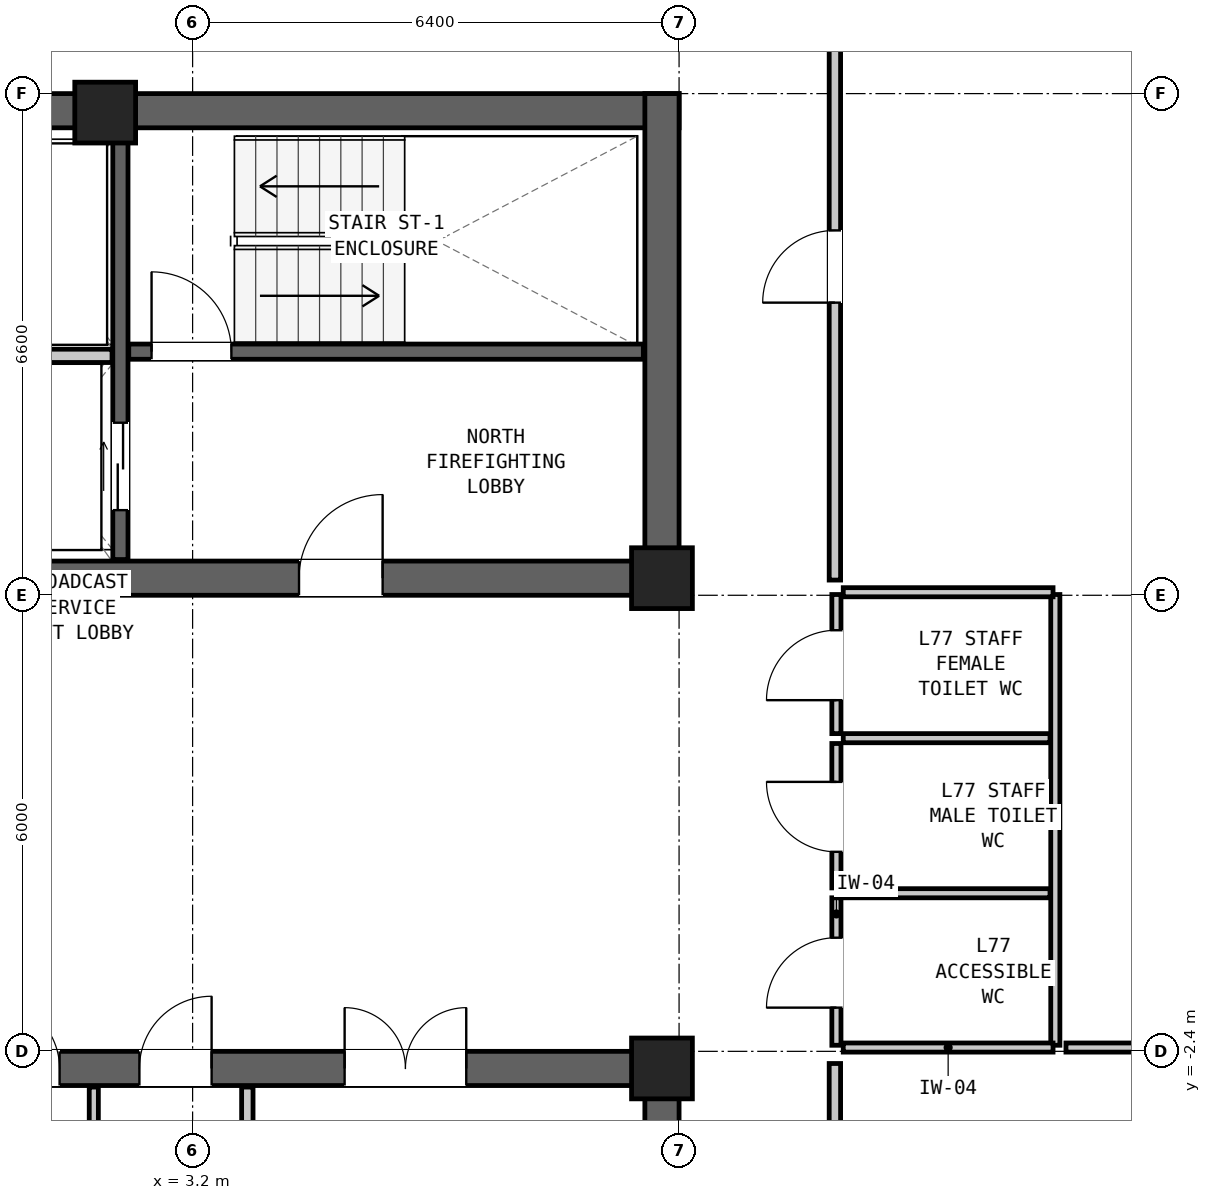
"""IFC4 building model, lengths in metres.
Left out: names, types, materials, properties, quantities, classifications, styles, units other than length and angle.
Written with IfcOpenShell. Run it as: python <this file> out.ifc"""

import sys

from ifc_helpers import new_model, si_unit, direction, frame, frame_2d, origin, origin_2d, place, context, subcontext, project, spatial, rectangle, extrude, element, fill, save


model = new_model("IFC4")
c1 = context("Model", 3, precision=1e-05, world=origin(), true_north=direction((0.0, 1.0)))
c2 = subcontext(c1, "Body", "Model", "MODEL_VIEW")
j1 = project(units=[si_unit("LENGTHUNIT", "METRE"), si_unit("PLANEANGLEUNIT", "RADIAN")], contexts=[c1])
p1 = place(None, origin())
s1 = spatial("IfcSite", under=j1, at=p1, CompositionType="ELEMENT")
p2 = place(p1, origin())
s2 = spatial("IfcBuilding", under=s1, at=p2, CompositionType="ELEMENT")
p3 = place(p2, frame((0.0, 0.0, 261.15)))
s3 = spatial("IfcBuildingStorey", under=s2, at=p3, CompositionType="ELEMENT", Elevation=261.15)
p4 = place(p3, frame((-9.6, 9.975, 0.0), z_axis=(0.0, 0.0, 1.0), x_axis=(1.0, 0.0, 0.0)))
e1 = element("IfcWall", 1, at=p4, inside=s3, PredefinedType="SHEAR", context=c2, shape_type="SweptSolid", body=[
    extrude(rectangle(XDim=19.2, YDim=0.45, at=frame_2d((9.6, 0.0))), origin(), (0.0, 0.0, 1.0), 3.05),
])
p5 = place(p3, frame((-9.6, 3.825, 0.0), z_axis=(0.0, 0.0, 1.0), x_axis=(1.0, 0.0, 0.0)))
e2 = element("IfcWall", 2, at=p5, inside=s3, PredefinedType="SHEAR", context=c2, shape_type="SweptSolid", body=[
    extrude(rectangle(XDim=19.2, YDim=0.45, at=frame_2d((9.6, 0.0))), origin(), (0.0, 0.0, 1.0), 3.05),
])
p6 = place(p5, frame((14.2, 0.0, 0.0)))
e3 = element("IfcOpeningElement", 3, at=p6, cuts=e2, PredefinedType="OPENING", context=c2, shape_type="SweptSolid", body=[
    extrude(rectangle(XDim=1.1, YDim=2.08, at=frame_2d((0.55, 1.04))), frame((0.0, 0.237, 0.0), z_axis=(0.0, -1.0, 0.0), x_axis=(1.0, 0.0, 0.0)), (0.0, 0.0, 1.0), 0.474),
])
p7 = place(p5, frame((8.2, 0.0, 0.0)))
e4 = element("IfcOpeningElement", 4, at=p7, cuts=e2, PredefinedType="OPENING", context=c2, shape_type="SweptSolid", body=[
    extrude(rectangle(XDim=1.15, YDim=2.1, at=frame_2d((0.575, 1.05))), frame((0.0, 0.237, 0.0), z_axis=(0.0, -1.0, 0.0), x_axis=(1.0, 0.0, 0.0)), (0.0, 0.0, 1.0), 0.474),
])
p8 = place(p5, frame((2.5, 0.0, 0.0)))
e5 = element("IfcOpeningElement", 5, at=p8, cuts=e2, PredefinedType="OPENING", context=c2, shape_type="SweptSolid", body=[
    extrude(rectangle(XDim=1.6, YDim=2.12, at=frame_2d((0.8, 1.06))), frame((0.0, 0.237, 0.0), z_axis=(0.0, -1.0, 0.0), x_axis=(1.0, 0.0, 0.0)), (0.0, 0.0, 1.0), 0.474),
])
p9 = place(p3, frame((9.375, 3.6, 0.0), z_axis=(0.0, 0.0, 1.0), x_axis=(0.0, 1.0, 0.0)))
e6 = element("IfcWall", 6, at=p9, inside=s3, PredefinedType="SHEAR", context=c2, shape_type="SweptSolid", body=[
    extrude(rectangle(XDim=6.6, YDim=0.45, at=frame_2d((3.3, 0.0))), origin(), (0.0, 0.0, 1.0), 3.05),
])
p10 = place(p3, frame((-9.6, -2.625, 0.0), z_axis=(0.0, 0.0, 1.0), x_axis=(1.0, 0.0, 0.0)))
e7 = element("IfcWall", 7, at=p10, inside=s3, PredefinedType="SHEAR", context=c2, shape_type="SweptSolid", body=[
    extrude(rectangle(XDim=19.2, YDim=0.45, at=frame_2d((9.6, 0.0))), origin(), (0.0, 0.0, 1.0), 3.05),
])
p11 = place(p10, frame((3.8, 0.0, 0.0)))
e8 = element("IfcOpeningElement", 8, at=p11, cuts=e7, PredefinedType="OPENING", context=c2, shape_type="SweptSolid", body=[
    extrude(rectangle(XDim=1.1, YDim=2.08, at=frame_2d((0.55, 1.04))), frame((0.0, 0.237, 0.0), z_axis=(0.0, -1.0, 0.0), x_axis=(1.0, 0.0, 0.0)), (0.0, 0.0, 1.0), 0.474),
])
p12 = place(p10, frame((10.15, 0.0, 0.0)))
e9 = element("IfcOpeningElement", 9, at=p12, cuts=e7, PredefinedType="OPENING", context=c2, shape_type="SweptSolid", body=[
    extrude(rectangle(XDim=0.9, YDim=2.05, at=frame_2d((0.45, 1.025))), frame((0.0, 0.237, 0.0), z_axis=(0.0, -1.0, 0.0), x_axis=(1.0, 0.0, 0.0)), (0.0, 0.0, 1.0), 0.474),
])
p13 = place(p10, frame((12.1, 0.0, 0.0)))
e10 = element("IfcOpeningElement", 10, at=p13, cuts=e7, PredefinedType="OPENING", context=c2, shape_type="SweptSolid", body=[
    extrude(rectangle(XDim=0.95, YDim=2.1, at=frame_2d((0.475, 1.05))), frame((0.0, 0.237, 0.0), z_axis=(0.0, -1.0, 0.0), x_axis=(1.0, 0.0, 0.0)), (0.0, 0.0, 1.0), 0.474),
])
p14 = place(p10, frame((14.8, 0.0, 0.0)))
e11 = element("IfcOpeningElement", 11, at=p14, cuts=e7, PredefinedType="OPENING", context=c2, shape_type="SweptSolid", body=[
    extrude(rectangle(XDim=1.6, YDim=2.12, at=frame_2d((0.8, 1.06))), frame((0.0, 0.237, 0.0), z_axis=(0.0, -1.0, 0.0), x_axis=(1.0, 0.0, 0.0)), (0.0, 0.0, 1.0), 0.474),
])
p15 = place(p3, frame((9.375, -9.0, 0.0), z_axis=(0.0, 0.0, 1.0), x_axis=(0.0, 1.0, 0.0)))
e12 = element("IfcWall", 12, at=p15, inside=s3, PredefinedType="SHEAR", context=c2, shape_type="SweptSolid", body=[
    extrude(rectangle(XDim=6.6, YDim=0.45, at=frame_2d((3.3, 0.0))), origin(), (0.0, 0.0, 1.0), 3.05),
])
for number, where, z_axis, x_axis in (
    (13, (2.05, 9.95, 0.0), (0.0, 0.0, 1.0), (1.0, 0.0, 0.0)),
    (14, (9.375, 3.825, 0.0), (0.0, 0.0, 1.0), (1.0, 0.0, 0.0)),
    (15, (9.375, -2.625, 0.0), (0.0, 0.0, 1.0), (1.0, 0.0, 0.0)),
):
    element("IfcColumn", number, at=place(p3, frame(where, z_axis=z_axis, x_axis=x_axis)), inside=s3, PredefinedType="COLUMN", context=c2, shape_type="SweptSolid", body=[
        extrude(rectangle(XDim=0.8, YDim=0.8, at=origin_2d()), origin(), (0.0, 0.0, 1.0), 3.05),
    ])
p16 = place(p3, frame((2.36, 6.805, 0.0), z_axis=(0.0, 0.0, 1.0), x_axis=(1.0, 0.0, 0.0)))
e16 = element("IfcWall", 16, at=p16, inside=s3, PredefinedType="SHEAR", context=c2, shape_type="SweptSolid", body=[
    extrude(rectangle(XDim=6.77, YDim=0.2, at=frame_2d((3.385, 0.0))), origin(), (0.0, 0.0, 1.0), 2.86),
])
p17 = place(p16, frame((0.3, 0.0, 0.0)))
e17 = element("IfcOpeningElement", 17, at=p17, cuts=e16, PredefinedType="OPENING", context=c2, shape_type="SweptSolid", body=[
    extrude(rectangle(XDim=1.05, YDim=2.08, at=frame_2d((0.525, 1.04))), frame((0.0, 0.112, 0.0), z_axis=(0.0, -1.0, 0.0), x_axis=(1.0, 0.0, 0.0)), (0.0, 0.0, 1.0), 0.224),
])
p18 = place(p3, frame((2.25, 4.07, 0.0), z_axis=(0.0, 0.0, 1.0), x_axis=(0.0, 1.0, 0.0)))
e18 = element("IfcWall", 18, at=p18, inside=s3, PredefinedType="SHEAR", context=c2, shape_type="SweptSolid", body=[
    extrude(rectangle(XDim=5.66, YDim=0.2, at=frame_2d((2.83, 0.0))), origin(), (0.0, 0.0, 1.0), 2.86),
])
p19 = place(p18, frame((0.65, 0.0, 0.0)))
e19 = element("IfcOpeningElement", 19, at=p19, cuts=e18, PredefinedType="OPENING", context=c2, shape_type="SweptSolid", body=[
    extrude(rectangle(XDim=1.15, YDim=2.08, at=frame_2d((0.575, 1.04))), frame((0.0, 0.112, 0.0), z_axis=(0.0, -1.0, 0.0), x_axis=(1.0, 0.0, 0.0)), (0.0, 0.0, 1.0), 0.224),
])
p20 = place(p3, frame((0.16, 6.75, 0.0), z_axis=(0.0, 0.0, 1.0), x_axis=(1.0, 0.0, 0.0)))
e20 = element("IfcWall", 20, at=p20, inside=s3, PredefinedType="PARTITIONING", context=c2, shape_type="SweptSolid", body=[
    extrude(rectangle(XDim=1.98, YDim=0.175, at=frame_2d((0.99, 0.0))), origin(), (0.0, 0.0, 1.0), 2.86),
])
p21 = place(p3, frame((3.92, -8.53, 0.0), z_axis=(0.0, 0.0, 1.0), x_axis=(0.0, 1.0, 0.0)))
e21 = element("IfcWall", 21, at=p21, inside=s3, PredefinedType="PARTITIONING", context=c2, shape_type="SweptSolid", body=[
    extrude(rectangle(XDim=5.66, YDim=0.15, at=frame_2d((2.83, 0.0))), origin(), (0.0, 0.0, 1.0), 2.86),
])
p22 = place(p3, frame((1.9, -8.53, 0.0), z_axis=(0.0, 0.0, 1.0), x_axis=(0.0, 1.0, 0.0)))
e22 = element("IfcWall", 22, at=p22, inside=s3, PredefinedType="PARTITIONING", context=c2, shape_type="SweptSolid", body=[
    extrude(rectangle(XDim=5.66, YDim=0.12, at=frame_2d((2.83, 0.0))), origin(), (0.0, 0.0, 1.0), 2.86),
])
p23 = place(p3, frame((11.67, -2.32, 0.0), z_axis=(0.0, 0.0, 1.0), x_axis=(0.0, 1.0, 0.0)))
e23 = element("IfcWall", 23, at=p23, inside=s3, PredefinedType="PARTITIONING", context=c2, shape_type="SweptSolid", body=[
    extrude(rectangle(XDim=1.94, YDim=0.12, at=frame_2d((0.97, 0.0))), origin(), (0.0, 0.0, 1.0), 2.86),
])
p24 = place(p23, frame((0.495, 0.0, 0.0)))
e24 = element("IfcOpeningElement", 24, at=p24, cuts=e23, PredefinedType="OPENING", context=c2, shape_type="SweptSolid", body=[
    extrude(rectangle(XDim=0.92, YDim=2.1, at=frame_2d((0.46, 1.05))), frame((0.0, 0.072, 0.0), z_axis=(0.0, -1.0, 0.0), x_axis=(1.0, 0.0, 0.0)), (0.0, 0.0, 1.0), 0.144),
])
p25 = place(p3, frame((11.67, -0.25, 0.0), z_axis=(0.0, 0.0, 1.0), x_axis=(0.0, 1.0, 0.0)))
e25 = element("IfcWall", 25, at=p25, inside=s3, PredefinedType="PARTITIONING", context=c2, shape_type="SweptSolid", body=[
    extrude(rectangle(XDim=1.9, YDim=0.12, at=frame_2d((0.95, 0.0))), origin(), (0.0, 0.0, 1.0), 2.86),
])
p26 = place(p25, frame((0.475, 0.0, 0.0)))
e26 = element("IfcOpeningElement", 26, at=p26, cuts=e25, PredefinedType="OPENING", context=c2, shape_type="SweptSolid", body=[
    extrude(rectangle(XDim=0.92, YDim=2.1, at=frame_2d((0.46, 1.05))), frame((0.0, 0.072, 0.0), z_axis=(0.0, -1.0, 0.0), x_axis=(1.0, 0.0, 0.0)), (0.0, 0.0, 1.0), 0.144),
])
p27 = place(p3, frame((11.67, 1.78, 0.0), z_axis=(0.0, 0.0, 1.0), x_axis=(0.0, 1.0, 0.0)))
e27 = element("IfcWall", 27, at=p27, inside=s3, PredefinedType="PARTITIONING", context=c2, shape_type="SweptSolid", body=[
    extrude(rectangle(XDim=1.83, YDim=0.12, at=frame_2d((0.915, 0.0))), origin(), (0.0, 0.0, 1.0), 2.86),
])
p28 = place(p27, frame((0.44, 0.0, 0.0)))
e28 = element("IfcOpeningElement", 28, at=p28, cuts=e27, PredefinedType="OPENING", context=c2, shape_type="SweptSolid", body=[
    extrude(rectangle(XDim=0.92, YDim=2.1, at=frame_2d((0.46, 1.05))), frame((0.0, 0.072, 0.0), z_axis=(0.0, -1.0, 0.0), x_axis=(1.0, 0.0, 0.0)), (0.0, 0.0, 1.0), 0.144),
])
p29 = place(p3, frame((14.55, -2.32, 0.0), z_axis=(0.0, 0.0, 1.0), x_axis=(0.0, 1.0, 0.0)))
e29 = element("IfcWall", 29, at=p29, inside=s3, PredefinedType="PARTITIONING", context=c2, shape_type="SweptSolid", body=[
    extrude(rectangle(XDim=5.93, YDim=0.12, at=frame_2d((2.965, 0.0))), origin(), (0.0, 0.0, 1.0), 2.86),
])
for number, where, z_axis, x_axis in (
    (30, (11.76, -2.35, 0.0), (0.0, 0.0, 1.0), (1.0, 0.0, 0.0)),
    (31, (11.76, 3.64, 0.0), (0.0, 0.0, 1.0), (1.0, 0.0, 0.0)),
):
    element("IfcWall", number, at=place(p3, frame(where, z_axis=z_axis, x_axis=x_axis)), inside=s3, PredefinedType="PARTITIONING", context=c2, shape_type="SweptSolid", body=[
        extrude(rectangle(XDim=2.76, YDim=0.12, at=frame_2d((1.38, 0.0))), origin(), (0.0, 0.0, 1.0), 1.981),
    ])
for number, where, z_axis, x_axis in (
    (32, (11.76, -0.32, 0.0), (0.0, 0.0, 1.0), (1.0, 0.0, 0.0)),
    (33, (11.76, 1.72, 0.0), (0.0, 0.0, 1.0), (1.0, 0.0, 0.0)),
):
    element("IfcWall", number, at=place(p3, frame(where, z_axis=z_axis, x_axis=x_axis)), inside=s3, PredefinedType="PARTITIONING", context=c2, shape_type="SweptSolid", body=[
        extrude(rectangle(XDim=2.72, YDim=0.12, at=frame_2d((1.36, 0.0))), origin(), (0.0, 0.0, 1.0), 2.86),
    ])
p30 = place(p3, frame((14.69, -2.35, 0.0), z_axis=(0.0, 0.0, 1.0), x_axis=(1.0, 0.0, 0.0)))
e34 = element("IfcWall", 34, at=p30, inside=s3, PredefinedType="PARTITIONING", context=c2, shape_type="SweptSolid", body=[
    extrude(rectangle(XDim=6.927, YDim=0.12, at=frame_2d((3.464, 0.0))), origin(), (0.0, 0.0, 1.0), 1.981),
])
p31 = place(p3, frame((11.65, -10.85, 0.0), z_axis=(0.0, 0.0, 1.0), x_axis=(0.0, 1.0, 0.0)))
e35 = element("IfcWall", 35, at=p31, inside=s3, PredefinedType="PARTITIONING", context=c2, shape_type="SweptSolid", body=[
    extrude(rectangle(XDim=8.29, YDim=0.15, at=frame_2d((4.145, 0.0))), origin(), (0.0, 0.0, 1.0), 2.86),
])
p32 = place(p31, frame((3.67, 0.0, 0.0)))
e36 = element("IfcOpeningElement", 36, at=p32, cuts=e35, PredefinedType="OPENING", context=c2, shape_type="SweptSolid", body=[
    extrude(rectangle(XDim=0.95, YDim=2.1, at=frame_2d((0.475, 1.05))), frame((0.0, 0.087, 0.0), z_axis=(0.0, -1.0, 0.0), x_axis=(1.0, 0.0, 0.0)), (0.0, 0.0, 1.0), 0.174),
])
p33 = place(p3, frame((11.65, 3.8, 0.0), z_axis=(0.0, 0.0, 1.0), x_axis=(0.0, 1.0, 0.0)))
e37 = element("IfcWall", 37, at=p33, inside=s3, PredefinedType="PARTITIONING", context=c2, shape_type="SweptSolid", body=[
    extrude(rectangle(XDim=8.25, YDim=0.15, at=frame_2d((4.125, 0.0))), origin(), (0.0, 0.0, 1.0), 2.86),
])
p34 = place(p33, frame((3.65, 0.0, 0.0)))
e38 = element("IfcOpeningElement", 38, at=p34, cuts=e37, PredefinedType="OPENING", context=c2, shape_type="SweptSolid", body=[
    extrude(rectangle(XDim=0.95, YDim=2.1, at=frame_2d((0.475, 1.05))), frame((0.0, 0.087, 0.0), z_axis=(0.0, -1.0, 0.0), x_axis=(1.0, 0.0, 0.0)), (0.0, 0.0, 1.0), 0.174),
])
p35 = place(p17, origin())
e39 = element("IfcDoor", 39, at=p35, inside=s3, OperationType="SINGLE_SWING_LEFT", PredefinedType="DOOR", context=c2, shape_type="SweptSolid", body=[
    extrude(rectangle(XDim=1.05, YDim=2.08, at=frame_2d((0.525, 1.04))), frame((0.0, 0.025, 0.0), z_axis=(0.0, -1.0, 0.0), x_axis=(1.0, 0.0, 0.0)), (0.0, 0.0, 1.0), 0.05),
])
fill(e17, e39)
p36 = place(p6, origin())
e40 = element("IfcDoor", 40, at=p36, inside=s3, OperationType="SINGLE_SWING_RIGHT", PredefinedType="DOOR", context=c2, shape_type="SweptSolid", body=[
    extrude(rectangle(XDim=1.1, YDim=2.08, at=frame_2d((0.55, 1.04))), frame((0.0, 0.025, 0.0), z_axis=(0.0, -1.0, 0.0), x_axis=(1.0, 0.0, 0.0)), (0.0, 0.0, 1.0), 0.05),
])
fill(e3, e40)
p37 = place(p19, origin())
e41 = element("IfcDoor", 41, at=p37, inside=s3, OperationType="DOUBLE_DOOR_SLIDING", PredefinedType="DOOR", context=c2, shape_type="SweptSolid", body=[
    extrude(rectangle(XDim=1.15, YDim=2.08, at=frame_2d((0.575, 1.04))), frame((0.0, 0.025, 0.0), z_axis=(0.0, -1.0, 0.0), x_axis=(1.0, 0.0, 0.0)), (0.0, 0.0, 1.0), 0.05),
])
fill(e19, e41)
p38 = place(p12, origin())
e42 = element("IfcDoor", 42, at=p38, inside=s3, OperationType="SINGLE_SWING_LEFT", PredefinedType="DOOR", context=c2, shape_type="SweptSolid", body=[
    extrude(rectangle(XDim=0.9, YDim=2.05, at=frame_2d((0.45, 1.025))), frame((0.0, 0.025, 0.0), z_axis=(0.0, -1.0, 0.0), x_axis=(1.0, 0.0, 0.0)), (0.0, 0.0, 1.0), 0.05),
])
fill(e9, e42)
p39 = place(p13, origin())
e43 = element("IfcDoor", 43, at=p39, inside=s3, OperationType="SINGLE_SWING_RIGHT", PredefinedType="DOOR", context=c2, shape_type="SweptSolid", body=[
    extrude(rectangle(XDim=0.95, YDim=2.1, at=frame_2d((0.475, 1.05))), frame((0.0, 0.025, 0.0), z_axis=(0.0, -1.0, 0.0), x_axis=(1.0, 0.0, 0.0)), (0.0, 0.0, 1.0), 0.05),
])
fill(e10, e43)
p40 = place(p14, origin())
e44 = element("IfcDoor", 44, at=p40, inside=s3, OperationType="DOUBLE_DOOR_SINGLE_SWING", PredefinedType="DOOR", context=c2, shape_type="SweptSolid", body=[
    extrude(rectangle(XDim=1.6, YDim=2.12, at=frame_2d((0.8, 1.06))), frame((0.0, 0.025, 0.0), z_axis=(0.0, -1.0, 0.0), x_axis=(1.0, 0.0, 0.0)), (0.0, 0.0, 1.0), 0.05),
])
fill(e11, e44)
p41 = place(p24, origin())
e45 = element("IfcDoor", 45, at=p41, inside=s3, OperationType="SINGLE_SWING_LEFT", PredefinedType="DOOR", context=c2, shape_type="SweptSolid", body=[
    extrude(rectangle(XDim=0.92, YDim=2.1, at=frame_2d((0.46, 1.05))), frame((0.0, 0.025, 0.0), z_axis=(0.0, -1.0, 0.0), x_axis=(1.0, 0.0, 0.0)), (0.0, 0.0, 1.0), 0.05),
])
fill(e24, e45)
p42 = place(p26, origin())
e46 = element("IfcDoor", 46, at=p42, inside=s3, OperationType="SINGLE_SWING_RIGHT", PredefinedType="DOOR", context=c2, shape_type="SweptSolid", body=[
    extrude(rectangle(XDim=0.92, YDim=2.1, at=frame_2d((0.46, 1.05))), frame((0.0, 0.025, 0.0), z_axis=(0.0, -1.0, 0.0), x_axis=(1.0, 0.0, 0.0)), (0.0, 0.0, 1.0), 0.05),
])
fill(e26, e46)
p43 = place(p28, origin())
e47 = element("IfcDoor", 47, at=p43, inside=s3, OperationType="SINGLE_SWING_LEFT", PredefinedType="DOOR", context=c2, shape_type="SweptSolid", body=[
    extrude(rectangle(XDim=0.92, YDim=2.1, at=frame_2d((0.46, 1.05))), frame((0.0, 0.025, 0.0), z_axis=(0.0, -1.0, 0.0), x_axis=(1.0, 0.0, 0.0)), (0.0, 0.0, 1.0), 0.05),
])
fill(e28, e47)
p44 = place(p34, origin())
e48 = element("IfcDoor", 48, at=p44, inside=s3, OperationType="SINGLE_SWING_LEFT", PredefinedType="DOOR", context=c2, shape_type="SweptSolid", body=[
    extrude(rectangle(XDim=0.95, YDim=2.1, at=frame_2d((0.475, 1.05))), frame((0.0, 0.025, 0.0), z_axis=(0.0, -1.0, 0.0), x_axis=(1.0, 0.0, 0.0)), (0.0, 0.0, 1.0), 0.05),
])
fill(e38, e48)
save(model, sys.argv[1])
